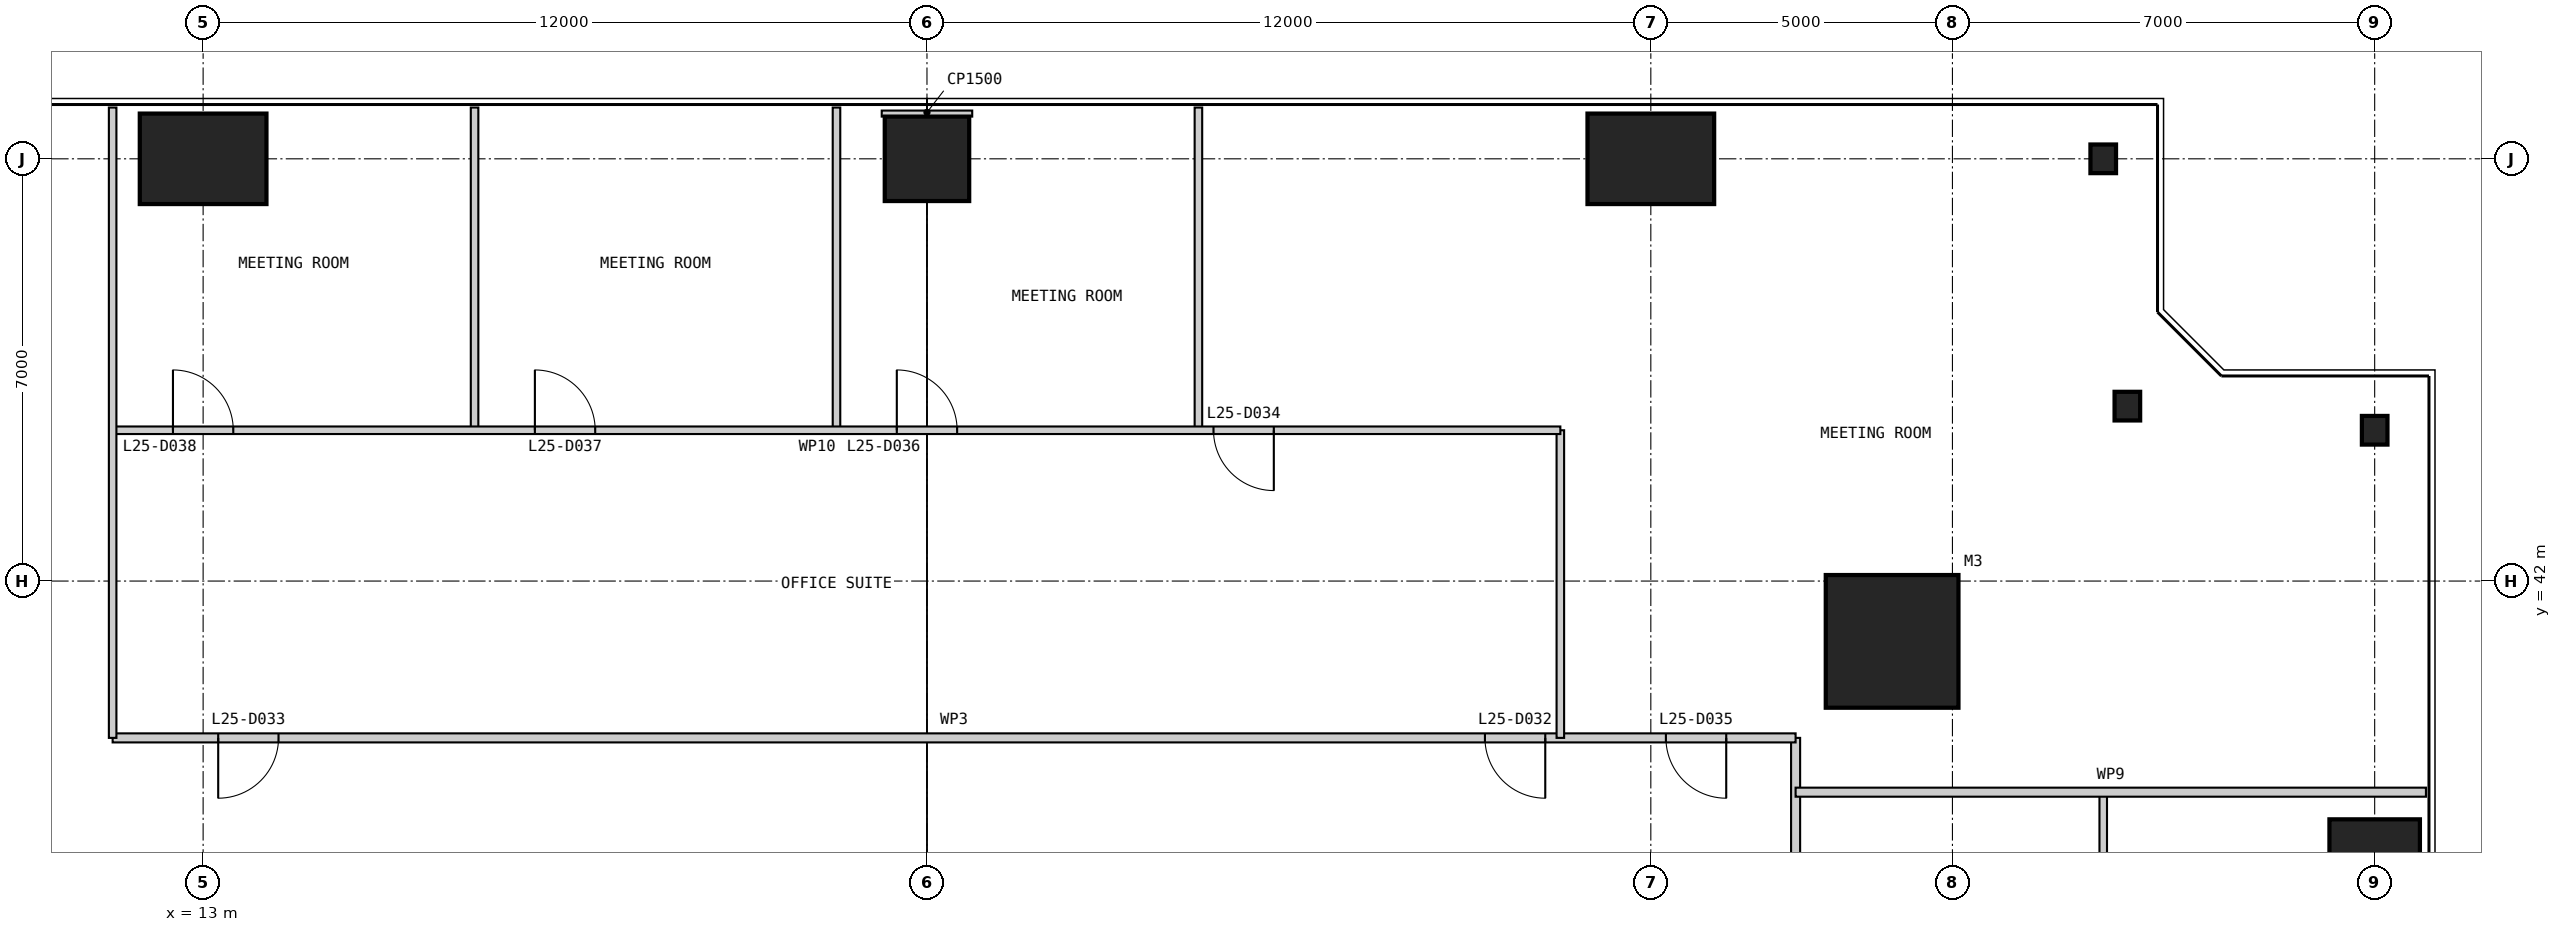
"""IFC4 building model, lengths in metres.
Left out: names, types, materials, properties, quantities, classifications, styles, units other than length and angle.
Written with IfcOpenShell. Run it as: python <this file> out.ifc"""

import sys

from ifc_helpers import new_model, si_unit, direction, frame, frame_2d, origin, origin_2d, place, context, subcontext, project, spatial, rectangle, i_section, extrude, element, fill, save


model = new_model("IFC4")
c1 = context("Model", 3, precision=1e-05, world=origin(), true_north=direction((0.0, 1.0)))
c2 = subcontext(c1, "Body", "Model", "MODEL_VIEW")
j1 = project(units=[si_unit("LENGTHUNIT", "METRE"), si_unit("PLANEANGLEUNIT", "RADIAN")], contexts=[c1])
p1 = place(None, origin())
s1 = spatial("IfcSite", under=j1, at=p1, CompositionType="ELEMENT")
p2 = place(p1, origin())
s2 = spatial("IfcBuilding", under=s1, at=p2, CompositionType="ELEMENT")
p3 = place(p2, frame((0.0, 0.0, 110.4)))
s3 = spatial("IfcBuildingStorey", under=s2, at=p3, CompositionType="ELEMENT", Elevation=110.4)
p4 = place(p3, frame((41.0, 41.0, 0.0), z_axis=(0.0, 0.0, 1.0), x_axis=(1.0, 0.0, 0.0)))
e1 = element("IfcColumn", 1, at=p4, inside=s3, PredefinedType="COLUMN", context=c2, shape_type="SweptSolid", body=[
    extrude(rectangle(XDim=2.2, YDim=2.2, at=origin_2d()), origin(), (0.0, 0.0, 1.0), 4.0),
])
p5 = place(p3, frame((49.0, 37.0, 0.0), z_axis=(0.0, 0.0, 1.0), x_axis=(1.0, 0.0, 0.0)))
e2 = element("IfcColumn", 2, at=p5, inside=s3, PredefinedType="COLUMN", context=c2, shape_type="SweptSolid", body=[
    extrude(rectangle(XDim=1.5, YDim=2.1, at=origin_2d()), origin(), (0.0, 0.0, 1.0), 4.0),
])
for number, where, z_axis, x_axis in (
    (3, (49.0, 44.5, 0.0), (0.0, 0.0, 1.0), (1.0, 0.0, 0.0)),
    (4, (44.9, 44.9, 0.0), (0.0, 0.0, 1.0), (1.0, 0.0, 0.0)),
    (5, (44.5, 49.0, 0.0), (0.0, 0.0, 1.0), (1.0, 0.0, 0.0)),
):
    element("IfcColumn", number, at=place(p3, frame(where, z_axis=z_axis, x_axis=x_axis)), inside=s3, PredefinedType="COLUMN", context=c2, shape_type="SweptSolid", body=[
        extrude(i_section(OverallWidth=0.424, OverallDepth=0.475, WebThickness=0.048, FlangeThickness=0.077, at=origin_2d()), origin(), (0.0, 0.0, 1.0), 4.0),
    ])
p6 = place(p3, frame((37.0, 49.0, 0.0), z_axis=(0.0, 0.0, 1.0), x_axis=(1.0, 0.0, 0.0)))
e6 = element("IfcColumn", 6, at=p6, inside=s3, PredefinedType="COLUMN", context=c2, shape_type="SweptSolid", body=[
    extrude(rectangle(XDim=2.1, YDim=1.5, at=origin_2d()), origin(), (0.0, 0.0, 1.0), 4.0),
])
p7 = place(p3, frame((25.0, 49.0, 0.0), z_axis=(0.0, 0.0, 1.0), x_axis=(1.0, 0.0, 0.0)))
e7 = element("IfcColumn", 7, at=p7, inside=s3, PredefinedType="COLUMN", context=c2, shape_type="SweptSolid", body=[
    extrude(rectangle(XDim=1.4, YDim=1.4, at=origin_2d()), origin(), (0.0, 0.0, 1.0), 4.0),
])
p8 = place(p3, frame((13.0, 49.0, 0.0), z_axis=(0.0, 0.0, 1.0), x_axis=(1.0, 0.0, 0.0)))
e8 = element("IfcColumn", 8, at=p8, inside=s3, PredefinedType="COLUMN", context=c2, shape_type="SweptSolid", body=[
    extrude(rectangle(XDim=2.1, YDim=1.5, at=origin_2d()), origin(), (0.0, 0.0, 1.0), 4.0),
])
p9 = place(p3, frame((39.4, 10.6, 0.0), z_axis=(0.0, 0.0, 1.0), x_axis=(0.0, 1.0, 0.0)))
e9 = element("IfcWall", 9, at=p9, inside=s3, PredefinedType="PARTITIONING", context=c2, shape_type="SweptSolid", body=[
    extrude(rectangle(XDim=28.8, YDim=0.15, at=frame_2d((14.4, 0.0))), origin(), (0.0, 0.0, 1.0), 3.85),
])
p10 = place(p9, frame((12.4, 0.0, 0.0)))
e10 = element("IfcOpeningElement", 10, at=p10, cuts=e9, PredefinedType="OPENING", context=c2, shape_type="SweptSolid", body=[
    extrude(rectangle(XDim=1.0, YDim=2.2, at=frame_2d((0.5, 1.1))), frame((0.0, 0.085, 0.0), z_axis=(0.0, -1.0, 0.0), x_axis=(1.0, 0.0, 0.0)), (0.0, 0.0, 1.0), 0.17),
])
p11 = place(p3, frame((44.5, 14.5, 0.0), z_axis=(0.0, 0.0, 1.0), x_axis=(0.0, 1.0, 0.0)))
e11 = element("IfcWall", 11, at=p11, inside=s3, PredefinedType="PARTITIONING", context=c2, shape_type="SweptSolid", body=[
    extrude(rectangle(XDim=24.0, YDim=0.125, at=frame_2d((12.0, 0.0))), origin(), (0.0, 0.0, 1.0), 3.85),
])
p12 = place(p11, frame((10.05, 0.0, 0.0)))
e12 = element("IfcOpeningElement", 12, at=p12, cuts=e11, PredefinedType="OPENING", context=c2, shape_type="SweptSolid", body=[
    extrude(rectangle(XDim=0.9, YDim=2.2, at=frame_2d((0.45, 1.1))), frame((0.0, 0.073, 0.0), z_axis=(0.0, -1.0, 0.0), x_axis=(1.0, 0.0, 0.0)), (0.0, 0.0, 1.0), 0.145),
])
p13 = place(p11, frame((16.05, 0.0, 0.0)))
e13 = element("IfcOpeningElement", 13, at=p13, cuts=e11, PredefinedType="OPENING", context=c2, shape_type="SweptSolid", body=[
    extrude(rectangle(XDim=0.9, YDim=2.2, at=frame_2d((0.45, 1.1))), frame((0.0, 0.073, 0.0), z_axis=(0.0, -1.0, 0.0), x_axis=(1.0, 0.0, 0.0)), (0.0, 0.0, 1.0), 0.145),
])
p14 = place(p11, frame((19.0, 0.0, 0.0)))
e14 = element("IfcOpeningElement", 14, at=p14, cuts=e11, PredefinedType="OPENING", context=c2, shape_type="SweptSolid", body=[
    extrude(rectangle(XDim=1.0, YDim=2.2, at=frame_2d((0.5, 1.1))), frame((0.0, 0.073, 0.0), z_axis=(0.0, -1.0, 0.0), x_axis=(1.0, 0.0, 0.0)), (0.0, 0.0, 1.0), 0.145),
])
p15 = place(p3, frame((39.4, 39.4, 0.0), z_axis=(0.0, 0.0, 1.0), x_axis=(-1.0, 0.0, 0.0)))
e15 = element("IfcWall", 15, at=p15, inside=s3, PredefinedType="PARTITIONING", context=c2, shape_type="SweptSolid", body=[
    extrude(rectangle(XDim=27.9, YDim=0.15, at=frame_2d((13.95, 0.0))), origin(), (0.0, 0.0, 1.0), 3.85),
])
p16 = place(p15, frame((4.15, 0.0, 0.0)))
e16 = element("IfcOpeningElement", 16, at=p16, cuts=e15, PredefinedType="OPENING", context=c2, shape_type="SweptSolid", body=[
    extrude(rectangle(XDim=1.0, YDim=2.2, at=frame_2d((0.5, 1.1))), frame((0.0, 0.085, 0.0), z_axis=(0.0, -1.0, 0.0), x_axis=(1.0, 0.0, 0.0)), (0.0, 0.0, 1.0), 0.17),
])
p17 = place(p15, frame((25.15, 0.0, 0.0)))
e17 = element("IfcOpeningElement", 17, at=p17, cuts=e15, PredefinedType="OPENING", context=c2, shape_type="SweptSolid", body=[
    extrude(rectangle(XDim=1.0, YDim=2.2, at=frame_2d((0.5, 1.1))), frame((0.0, 0.085, 0.0), z_axis=(0.0, -1.0, 0.0), x_axis=(1.0, 0.0, 0.0)), (0.0, 0.0, 1.0), 0.17),
])
p18 = place(p15, frame((1.15, 0.0, 0.0)))
e18 = element("IfcOpeningElement", 18, at=p18, cuts=e15, PredefinedType="OPENING", context=c2, shape_type="SweptSolid", body=[
    extrude(rectangle(XDim=1.0, YDim=2.2, at=frame_2d((0.5, 1.1))), frame((0.0, 0.085, 0.0), z_axis=(0.0, -1.0, 0.0), x_axis=(1.0, 0.0, 0.0)), (0.0, 0.0, 1.0), 0.17),
])
p19 = place(p3, frame((49.85, 38.5, 0.0), z_axis=(0.0, 0.0, 1.0), x_axis=(-1.0, 0.0, 0.0)))
e19 = element("IfcWall", 19, at=p19, inside=s3, PredefinedType="PARTITIONING", context=c2, shape_type="SweptSolid", body=[
    extrude(rectangle(XDim=10.45, YDim=0.15, at=frame_2d((5.225, 0.0))), origin(), (0.0, 0.0, 1.0), 3.85),
])
p20 = place(p3, frame((35.5, 44.5, 0.0), z_axis=(0.0, 0.0, 1.0), x_axis=(0.0, -1.0, 0.0)))
e20 = element("IfcWall", 20, at=p20, inside=s3, PredefinedType="PARTITIONING", context=c2, shape_type="SweptSolid", body=[
    extrude(rectangle(XDim=5.1, YDim=0.125, at=frame_2d((2.55, 0.0))), origin(), (0.0, 0.0, 1.0), 3.85),
])
for number, where, z_axis, x_axis in (
    (21, (29.5, 49.85, 0.0), (0.0, 0.0, 1.0), (0.0, -1.0, 0.0)),
    (22, (23.5, 49.85, 0.0), (0.0, 0.0, 1.0), (0.0, -1.0, 0.0)),
    (23, (17.5, 49.85, 0.0), (0.0, 0.0, 1.0), (0.0, -1.0, 0.0)),
):
    element("IfcWall", number, at=place(p3, frame(where, z_axis=z_axis, x_axis=x_axis)), inside=s3, PredefinedType="PARTITIONING", context=c2, shape_type="SweptSolid", body=[
        extrude(rectangle(XDim=5.35, YDim=0.125, at=frame_2d((2.675, 0.0))), origin(), (0.0, 0.0, 1.0), 3.85),
    ])
p21 = place(p3, frame((35.5, 44.5, 0.0), z_axis=(0.0, 0.0, 1.0), x_axis=(-1.0, 0.0, 0.0)))
e24 = element("IfcWall", 24, at=p21, inside=s3, PredefinedType="PARTITIONING", context=c2, shape_type="SweptSolid", body=[
    extrude(rectangle(XDim=24.0, YDim=0.125, at=frame_2d((12.0, 0.0))), origin(), (0.0, 0.0, 1.0), 3.85),
])
p22 = place(p21, frame((4.75, 0.0, 0.0)))
e25 = element("IfcOpeningElement", 25, at=p22, cuts=e24, PredefinedType="OPENING", context=c2, shape_type="SweptSolid", body=[
    extrude(rectangle(XDim=1.0, YDim=2.2, at=frame_2d((0.5, 1.1))), frame((0.0, 0.073, 0.0), z_axis=(0.0, -1.0, 0.0), x_axis=(1.0, 0.0, 0.0)), (0.0, 0.0, 1.0), 0.145),
])
p23 = place(p21, frame((10.0, 0.0, 0.0)))
e26 = element("IfcOpeningElement", 26, at=p23, cuts=e24, PredefinedType="OPENING", context=c2, shape_type="SweptSolid", body=[
    extrude(rectangle(XDim=1.0, YDim=2.2, at=frame_2d((0.5, 1.1))), frame((0.0, 0.073, 0.0), z_axis=(0.0, -1.0, 0.0), x_axis=(1.0, 0.0, 0.0)), (0.0, 0.0, 1.0), 0.145),
])
p24 = place(p21, frame((16.0, 0.0, 0.0)))
e27 = element("IfcOpeningElement", 27, at=p24, cuts=e24, PredefinedType="OPENING", context=c2, shape_type="SweptSolid", body=[
    extrude(rectangle(XDim=1.0, YDim=2.2, at=frame_2d((0.5, 1.1))), frame((0.0, 0.073, 0.0), z_axis=(0.0, -1.0, 0.0), x_axis=(1.0, 0.0, 0.0)), (0.0, 0.0, 1.0), 0.145),
])
p25 = place(p21, frame((22.0, 0.0, 0.0)))
e28 = element("IfcOpeningElement", 28, at=p25, cuts=e24, PredefinedType="OPENING", context=c2, shape_type="SweptSolid", body=[
    extrude(rectangle(XDim=1.0, YDim=2.2, at=frame_2d((0.5, 1.1))), frame((0.0, 0.073, 0.0), z_axis=(0.0, -1.0, 0.0), x_axis=(1.0, 0.0, 0.0)), (0.0, 0.0, 1.0), 0.145),
])
p26 = place(p3, frame((11.5, 49.85, 0.0), z_axis=(0.0, 0.0, 1.0), x_axis=(0.0, -1.0, 0.0)))
e29 = element("IfcWall", 29, at=p26, inside=s3, PredefinedType="PARTITIONING", context=c2, shape_type="SweptSolid", body=[
    extrude(rectangle(XDim=10.45, YDim=0.125, at=frame_2d((5.225, 0.0))), origin(), (0.0, 0.0, 1.0), 3.85),
])
p27 = place(p3, frame((25.0, 49.8, 0.0), z_axis=(0.0, 0.0, 1.0), x_axis=(0.0, -1.0, 0.0)))
e30 = element("IfcWall", 30, at=p27, inside=s3, PredefinedType="PARTITIONING", context=c2, shape_type="SweptSolid", body=[
    extrude(rectangle(XDim=0.1, YDim=1.5, at=frame_2d((0.05, 0.0))), origin(), (0.0, 0.0, 1.0), 3.85),
])
p28 = place(p16, origin())
e31 = element("IfcDoor", 31, at=p28, inside=s3, OperationType="SINGLE_SWING_LEFT", PredefinedType="DOOR", context=c2, shape_type="SweptSolid", body=[
    extrude(rectangle(XDim=1.0, YDim=2.2, at=frame_2d((0.5, 1.1))), frame((0.0, 0.025, 0.0), z_axis=(0.0, -1.0, 0.0), x_axis=(1.0, 0.0, 0.0)), (0.0, 0.0, 1.0), 0.05),
])
fill(e16, e31)
p29 = place(p17, origin())
e32 = element("IfcDoor", 32, at=p29, inside=s3, OperationType="SINGLE_SWING_RIGHT", PredefinedType="DOOR", context=c2, shape_type="SweptSolid", body=[
    extrude(rectangle(XDim=1.0, YDim=2.2, at=frame_2d((0.5, 1.1))), frame((0.0, 0.025, 0.0), z_axis=(0.0, -1.0, 0.0), x_axis=(1.0, 0.0, 0.0)), (0.0, 0.0, 1.0), 0.05),
])
fill(e17, e32)
p30 = place(p22, origin())
e33 = element("IfcDoor", 33, at=p30, inside=s3, OperationType="SINGLE_SWING_LEFT", PredefinedType="DOOR", context=c2, shape_type="SweptSolid", body=[
    extrude(rectangle(XDim=1.0, YDim=2.2, at=frame_2d((0.5, 1.1))), frame((0.0, 0.025, 0.0), z_axis=(0.0, -1.0, 0.0), x_axis=(1.0, 0.0, 0.0)), (0.0, 0.0, 1.0), 0.05),
])
fill(e25, e33)
p31 = place(p18, origin())
e34 = element("IfcDoor", 34, at=p31, inside=s3, OperationType="SINGLE_SWING_LEFT", PredefinedType="DOOR", context=c2, shape_type="SweptSolid", body=[
    extrude(rectangle(XDim=1.0, YDim=2.2, at=frame_2d((0.5, 1.1))), frame((0.0, 0.025, 0.0), z_axis=(0.0, -1.0, 0.0), x_axis=(1.0, 0.0, 0.0)), (0.0, 0.0, 1.0), 0.05),
])
fill(e18, e34)
p32 = place(p23, frame((1.0, 0.0, 0.0), z_axis=(0.0, 0.0, 1.0), x_axis=(-1.0, 0.0, 0.0)))
e35 = element("IfcDoor", 35, at=p32, inside=s3, OperationType="SINGLE_SWING_LEFT", PredefinedType="DOOR", context=c2, shape_type="SweptSolid", body=[
    extrude(rectangle(XDim=1.0, YDim=2.2, at=frame_2d((0.5, 1.1))), frame((0.0, 0.025, 0.0), z_axis=(0.0, -1.0, 0.0), x_axis=(1.0, 0.0, 0.0)), (0.0, 0.0, 1.0), 0.05),
])
fill(e26, e35)
p33 = place(p24, frame((1.0, 0.0, 0.0), z_axis=(0.0, 0.0, 1.0), x_axis=(-1.0, 0.0, 0.0)))
e36 = element("IfcDoor", 36, at=p33, inside=s3, OperationType="SINGLE_SWING_LEFT", PredefinedType="DOOR", context=c2, shape_type="SweptSolid", body=[
    extrude(rectangle(XDim=1.0, YDim=2.2, at=frame_2d((0.5, 1.1))), frame((0.0, 0.025, 0.0), z_axis=(0.0, -1.0, 0.0), x_axis=(1.0, 0.0, 0.0)), (0.0, 0.0, 1.0), 0.05),
])
fill(e27, e36)
p34 = place(p25, frame((1.0, 0.0, 0.0), z_axis=(0.0, 0.0, 1.0), x_axis=(-1.0, 0.0, 0.0)))
e37 = element("IfcDoor", 37, at=p34, inside=s3, OperationType="SINGLE_SWING_LEFT", PredefinedType="DOOR", context=c2, shape_type="SweptSolid", body=[
    extrude(rectangle(XDim=1.0, YDim=2.2, at=frame_2d((0.5, 1.1))), frame((0.0, 0.025, 0.0), z_axis=(0.0, -1.0, 0.0), x_axis=(1.0, 0.0, 0.0)), (0.0, 0.0, 1.0), 0.05),
])
fill(e28, e37)
save(model, sys.argv[1])
